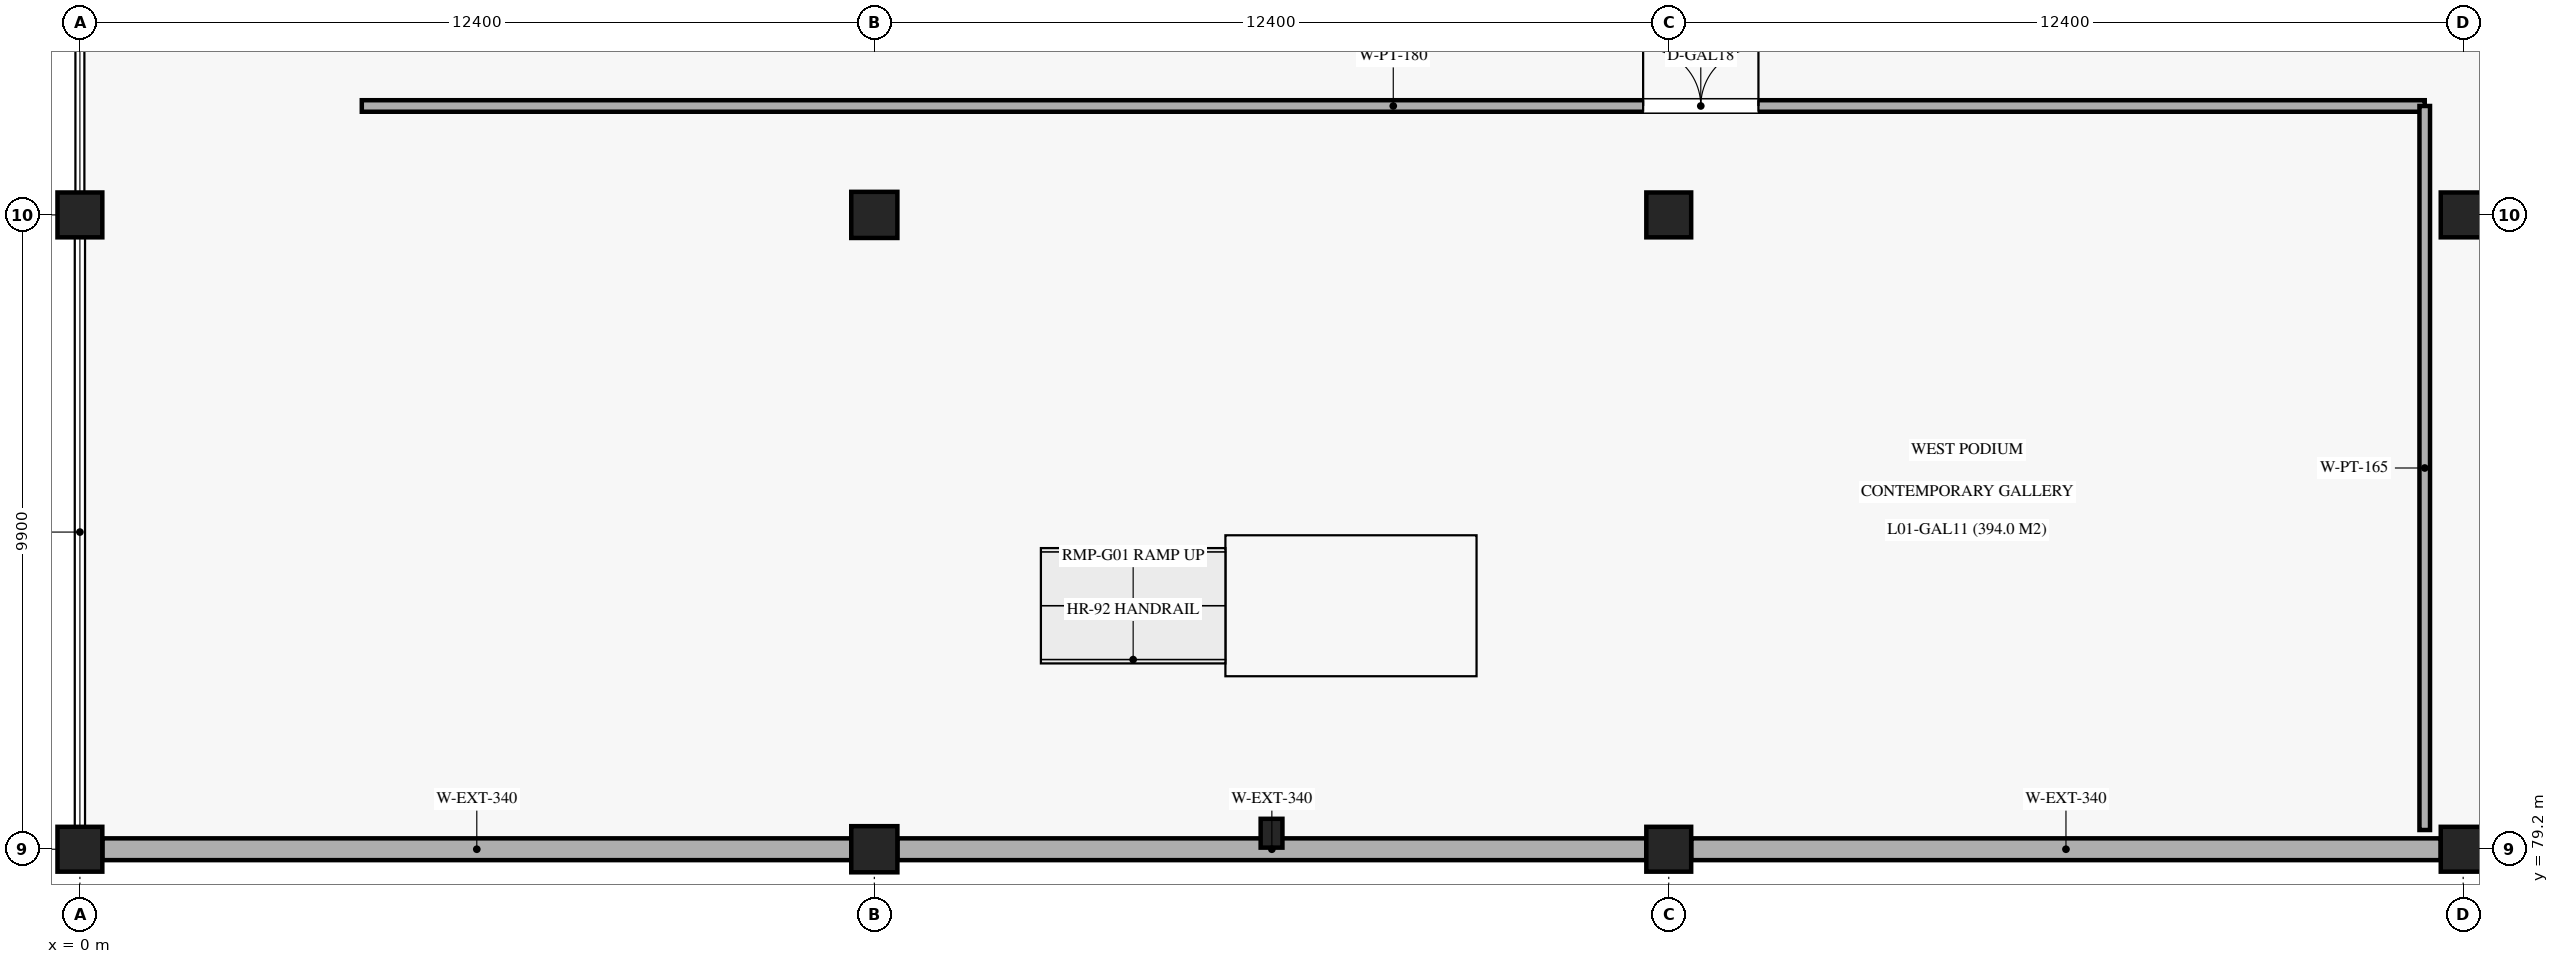
"""IFC4 building model, lengths in metres.
Left out: names, types, materials, properties, quantities, classifications, styles, units other than length and angle.
Written with IfcOpenShell. Run it as: python <this file> out.ifc"""

import sys

from ifc_helpers import new_model, si_unit, direction, frame, frame_2d, origin, origin_2d, place, context, subcontext, project, spatial, rectangle, circle, extrude, element, fill, save


model = new_model("IFC4")
c1 = context("Model", 3, precision=1e-05, world=origin(), true_north=direction((0.0, 1.0)))
c2 = subcontext(c1, "Body", "Model", "MODEL_VIEW")
j1 = project(units=[si_unit("LENGTHUNIT", "METRE"), si_unit("PLANEANGLEUNIT", "RADIAN")], contexts=[c1])
p1 = place(None, origin())
s1 = spatial("IfcSite", under=j1, at=p1, CompositionType="ELEMENT")
p2 = place(p1, origin())
s2 = spatial("IfcBuilding", under=s1, at=p2, CompositionType="ELEMENT")
p3 = place(p2, frame((0.0, 0.0, 5.44)))
s3 = spatial("IfcBuildingStorey", under=s2, at=p3, CompositionType="ELEMENT", Elevation=5.44)
for number, where, z_axis, x_axis in (
    (1, (0.0, 79.2, 0.0), (0.0, 0.0, 1.0), (1.0, 0.0, 0.0)),
    (2, (0.0, 89.1, 0.0), (0.0, 0.0, 1.0), (1.0, 0.0, 0.0)),
):
    element("IfcColumn", number, at=place(p3, frame(where, z_axis=z_axis, x_axis=x_axis)), inside=s3, PredefinedType="COLUMN", context=c2, shape_type="SweptSolid", body=[
        extrude(rectangle(XDim=0.7, YDim=0.7, at=origin_2d()), origin(), (0.0, 0.0, 1.0), 5.44),
    ])
for number, where, z_axis, x_axis in (
    (3, (12.4, 79.2, 0.0), (0.0, 0.0, 1.0), (1.0, 0.0, 0.0)),
    (4, (12.4, 89.1, 0.0), (0.0, 0.0, 1.0), (1.0, 0.0, 0.0)),
):
    element("IfcColumn", number, at=place(p3, frame(where, z_axis=z_axis, x_axis=x_axis)), inside=s3, PredefinedType="COLUMN", context=c2, shape_type="SweptSolid", body=[
        extrude(circle(Radius=0.36, at=origin_2d()), origin(), (0.0, 0.0, 1.0), 5.44),
    ])
for number, where, z_axis, x_axis in (
    (5, (24.8, 79.2, 0.0), (0.0, 0.0, 1.0), (1.0, 0.0, 0.0)),
    (6, (24.8, 89.1, 0.0), (0.0, 0.0, 1.0), (1.0, 0.0, 0.0)),
    (7, (37.2, 79.2, 0.0), (0.0, 0.0, 1.0), (1.0, 0.0, 0.0)),
    (8, (37.2, 89.1, 0.0), (0.0, 0.0, 1.0), (1.0, 0.0, 0.0)),
):
    element("IfcColumn", number, at=place(p3, frame(where, z_axis=z_axis, x_axis=x_axis)), inside=s3, PredefinedType="COLUMN", context=c2, shape_type="SweptSolid", body=[
        extrude(rectangle(XDim=0.7, YDim=0.7, at=origin_2d()), origin(), (0.0, 0.0, 1.0), 5.44),
    ])
p4 = place(p3, frame((18.6, 79.45, 0.0), z_axis=(0.0, 0.0, 1.0), x_axis=(1.0, 0.0, 0.0)))
e9 = element("IfcColumn", 9, at=p4, inside=s3, PredefinedType="PILASTER", context=c2, shape_type="SweptSolid", body=[
    extrude(rectangle(XDim=0.34, YDim=0.45, at=origin_2d()), origin(), (0.0, 0.0, 1.0), 5.44),
])
for number, where, z_axis, x_axis in (
    (10, (0.35, 79.2, 0.0), (0.0, 0.0, 1.0), (1.0, 0.0, 0.0)),
    (11, (12.76, 79.2, 0.0), (0.0, 0.0, 1.0), (1.0, 0.0, 0.0)),
):
    element("IfcWall", number, at=place(p3, frame(where, z_axis=z_axis, x_axis=x_axis)), inside=s3, PredefinedType="SOLIDWALL", context=c2, shape_type="SweptSolid", body=[
        extrude(rectangle(XDim=11.69, YDim=0.34, at=frame_2d((5.845, 0.0))), origin(), (0.0, 0.0, 1.0), 4.33),
    ])
p5 = place(p3, frame((25.15, 79.2, 0.0), z_axis=(0.0, 0.0, 1.0), x_axis=(1.0, 0.0, 0.0)))
e12 = element("IfcWall", 12, at=p5, inside=s3, PredefinedType="SOLIDWALL", context=c2, shape_type="SweptSolid", body=[
    extrude(rectangle(XDim=11.7, YDim=0.34, at=frame_2d((5.85, 0.0))), origin(), (0.0, 0.0, 1.0), 4.33),
])
p6 = place(p3, frame((4.4, 90.8, 0.0), z_axis=(0.0, 0.0, 1.0), x_axis=(1.0, 0.0, 0.0)))
e13 = element("IfcWall", 13, at=p6, inside=s3, PredefinedType="PARTITIONING", context=c2, shape_type="SweptSolid", body=[
    extrude(rectangle(XDim=32.2, YDim=0.18, at=frame_2d((16.1, 0.0))), origin(), (0.0, 0.0, 1.0), 4.3),
])
p7 = place(p6, frame((20.0, 0.0, 0.0)))
e14 = element("IfcOpeningElement", 14, at=p7, cuts=e13, PredefinedType="OPENING", context=c2, shape_type="SweptSolid", body=[
    extrude(rectangle(XDim=1.8, YDim=2.45, at=frame_2d((0.9, 1.225))), frame((0.0, 0.1, 0.0), z_axis=(0.0, -1.0, 0.0), x_axis=(1.0, 0.0, 0.0)), (0.0, 0.0, 1.0), 0.2),
])
p8 = place(p3, frame((36.6, 79.5, 0.0), z_axis=(0.0, 0.0, 1.0), x_axis=(0.0, 1.0, 0.0)))
e15 = element("IfcWall", 15, at=p8, inside=s3, PredefinedType="PARTITIONING", context=c2, shape_type="SweptSolid", body=[
    extrude(rectangle(XDim=11.3, YDim=0.165, at=frame_2d((5.65, 0.0))), origin(), (0.0, 0.0, 1.0), 4.3),
])
p9 = place(p7, origin())
e16 = element("IfcDoor", 16, at=p9, inside=s3, OperationType="DOUBLE_DOOR_SINGLE_SWING", PredefinedType="DOOR", context=c2, shape_type="SweptSolid", body=[
    extrude(rectangle(XDim=1.8, YDim=2.45, at=frame_2d((0.9, 1.225))), frame((0.0, 0.025, 0.0), z_axis=(0.0, -1.0, 0.0), x_axis=(1.0, 0.0, 0.0)), (0.0, 0.0, 1.0), 0.05),
])
fill(e14, e16)
save(model, sys.argv[1])
